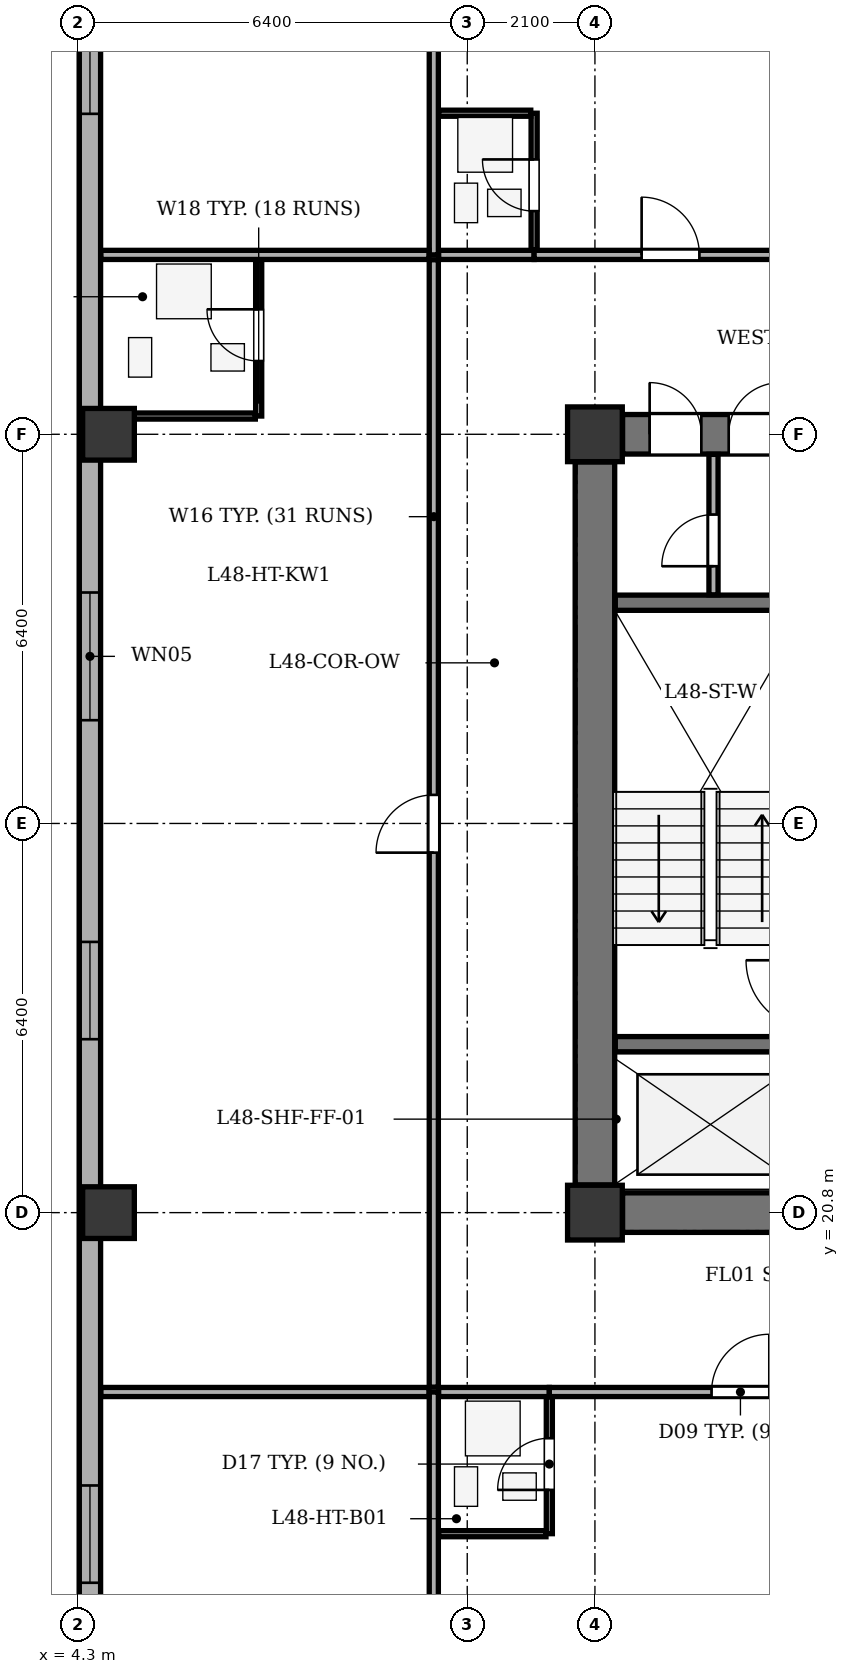
"""IFC4 building model, lengths in metres.
Left out: names, types, materials, properties, quantities, classifications, styles, units other than length and angle.
Written with IfcOpenShell. Run it as: python <this file> out.ifc"""

import sys

from ifc_helpers import new_model, si_unit, direction, frame, frame_2d, origin, origin_2d, place, context, subcontext, project, spatial, rectangle, extrude, element, fill, save


model = new_model("IFC4")
c1 = context("Model", 3, precision=1e-05, world=origin(), true_north=direction((0.0, 1.0)))
c2 = subcontext(c1, "Body", "Model", "MODEL_VIEW")
j1 = project(units=[si_unit("LENGTHUNIT", "METRE"), si_unit("PLANEANGLEUNIT", "RADIAN")], contexts=[c1])
p1 = place(None, origin())
s1 = spatial("IfcSite", under=j1, at=p1, CompositionType="ELEMENT")
p2 = place(p1, origin())
s2 = spatial("IfcBuilding", under=s1, at=p2, CompositionType="ELEMENT")
p3 = place(p2, frame((0.0, 0.0, 186.8)))
s3 = spatial("IfcBuildingStorey", under=s2, at=p3, CompositionType="ELEMENT", Elevation=186.8)
for number, where, z_axis, x_axis in (
    (1, (12.8, 20.8, 0.0), (0.0, 0.0, 1.0), (1.0, 0.0, 0.0)),
    (2, (12.8, 33.6, 0.0), (0.0, 0.0, 1.0), (1.0, 0.0, 0.0)),
):
    element("IfcColumn", number, at=place(p3, frame(where, z_axis=z_axis, x_axis=x_axis)), inside=s3, PredefinedType="COLUMN", context=c2, shape_type="SweptSolid", body=[
        extrude(rectangle(XDim=0.9, YDim=0.9, at=origin_2d()), origin(), (0.0, 0.0, 1.0), 3.5),
    ])
for number, where, z_axis, x_axis in (
    (3, (4.8, 20.8, 0.0), (0.0, 0.0, 1.0), (1.0, 0.0, 0.0)),
    (4, (4.8, 33.6, 0.0), (0.0, 0.0, 1.0), (1.0, 0.0, 0.0)),
):
    element("IfcColumn", number, at=place(p3, frame(where, z_axis=z_axis, x_axis=x_axis)), inside=s3, PredefinedType="COLUMN", context=c2, shape_type="SweptSolid", body=[
        extrude(rectangle(XDim=0.85, YDim=0.85, at=origin_2d()), origin(), (0.0, 0.0, 1.0), 3.5),
    ])
p4 = place(p3, frame((4.495, 12.9, 0.0), z_axis=(0.0, 0.0, 1.0), x_axis=(0.0, 1.0, 0.0)))
e5 = element("IfcWall", 5, at=p4, inside=s3, PredefinedType="STANDARD", context=c2, shape_type="SweptSolid", body=[
    extrude(rectangle(XDim=35.0, YDim=0.35, at=frame_2d((17.5, 0.0))), origin(), (0.0, 0.0, 1.0), 2.785),
])
p5 = place(p4, frame((1.813, 0.0, 0.75)))
e6 = element("IfcOpeningElement", 6, at=p5, cuts=e5, PredefinedType="OPENING", context=c2, shape_type="SweptSolid", body=[
    extrude(rectangle(XDim=1.6, YDim=1.75, at=frame_2d((0.8, 0.875))), frame((0.0, 0.185, 0.0), z_axis=(0.0, -1.0, 0.0), x_axis=(1.0, 0.0, 0.0)), (0.0, 0.0, 1.0), 0.37),
])
p6 = place(p4, frame((10.752, 0.0, 0.75)))
e7 = element("IfcOpeningElement", 7, at=p6, cuts=e5, PredefinedType="OPENING", context=c2, shape_type="SweptSolid", body=[
    extrude(rectangle(XDim=1.6, YDim=1.75, at=frame_2d((0.8, 0.875))), frame((0.0, 0.185, 0.0), z_axis=(0.0, -1.0, 0.0), x_axis=(1.0, 0.0, 0.0)), (0.0, 0.0, 1.0), 0.37),
])
p7 = place(p4, frame((15.998, 0.0, 0.75)))
e8 = element("IfcOpeningElement", 8, at=p7, cuts=e5, PredefinedType="OPENING", context=c2, shape_type="SweptSolid", body=[
    extrude(rectangle(XDim=2.1, YDim=1.75, at=frame_2d((1.05, 0.875))), frame((0.0, 0.185, 0.0), z_axis=(0.0, -1.0, 0.0), x_axis=(1.0, 0.0, 0.0)), (0.0, 0.0, 1.0), 0.37),
])
p8 = place(p4, frame((25.97, 0.0, 0.75)))
e9 = element("IfcOpeningElement", 9, at=p8, cuts=e5, PredefinedType="OPENING", context=c2, shape_type="SweptSolid", body=[
    extrude(rectangle(XDim=1.6, YDim=1.75, at=frame_2d((0.8, 0.875))), frame((0.0, 0.185, 0.0), z_axis=(0.0, -1.0, 0.0), x_axis=(1.0, 0.0, 0.0)), (0.0, 0.0, 1.0), 0.37),
])
p9 = place(p4, frame((30.555, 0.0, 0.75)))
e10 = element("IfcOpeningElement", 10, at=p9, cuts=e5, PredefinedType="OPENING", context=c2, shape_type="SweptSolid", body=[
    extrude(rectangle(XDim=2.1, YDim=1.75, at=frame_2d((1.05, 0.875))), frame((0.0, 0.185, 0.0), z_axis=(0.0, -1.0, 0.0), x_axis=(1.0, 0.0, 0.0)), (0.0, 0.0, 1.0), 0.37),
])
p10 = place(p3, frame((12.8, 21.255, 0.0), z_axis=(0.0, 0.0, 1.0), x_axis=(0.0, 1.0, 0.0)))
e11 = element("IfcWall", 11, at=p10, inside=s3, PredefinedType="SHEAR", context=c2, shape_type="SweptSolid", body=[
    extrude(rectangle(XDim=11.89, YDim=0.65, at=frame_2d((5.945, 0.0))), origin(), (0.0, 0.0, 1.0), 3.2),
])
p11 = place(p3, frame((13.255, 20.8, 0.0), z_axis=(0.0, 0.0, 1.0), x_axis=(1.0, 0.0, 0.0)))
e12 = element("IfcWall", 12, at=p11, inside=s3, PredefinedType="SHEAR", context=c2, shape_type="SweptSolid", body=[
    extrude(rectangle(XDim=7.09, YDim=0.65, at=frame_2d((3.545, 0.0))), origin(), (0.0, 0.0, 1.0), 3.2),
])
p12 = place(p3, frame((13.255, 33.6, 0.0), z_axis=(0.0, 0.0, 1.0), x_axis=(1.0, 0.0, 0.0)))
e13 = element("IfcWall", 13, at=p12, inside=s3, PredefinedType="SHEAR", context=c2, shape_type="SweptSolid", body=[
    extrude(rectangle(XDim=7.09, YDim=0.65, at=frame_2d((3.545, 0.0))), origin(), (0.0, 0.0, 1.0), 3.2),
])
p13 = place(p12, frame((0.445, 0.0, 0.0)))
e14 = element("IfcOpeningElement", 14, at=p13, cuts=e13, PredefinedType="OPENING", context=c2, shape_type="SweptSolid", body=[
    extrude(rectangle(XDim=0.85, YDim=2.02, at=frame_2d((0.425, 1.01))), frame((0.0, 0.335, 0.0), z_axis=(0.0, -1.0, 0.0), x_axis=(1.0, 0.0, 0.0)), (0.0, 0.0, 1.0), 0.67),
])
p14 = place(p12, frame((1.745, 0.0, 0.0)))
e15 = element("IfcOpeningElement", 15, at=p14, cuts=e13, PredefinedType="OPENING", context=c2, shape_type="SweptSolid", body=[
    extrude(rectangle(XDim=0.85, YDim=2.02, at=frame_2d((0.425, 1.01))), frame((0.0, 0.335, 0.0), z_axis=(0.0, -1.0, 0.0), x_axis=(1.0, 0.0, 0.0)), (0.0, 0.0, 1.0), 0.67),
])
for number, where, z_axis, x_axis in (
    (16, (13.135, 23.57, 0.0), (0.0, 0.0, 1.0), (1.0, 0.0, 0.0)),
    (17, (13.135, 30.83, 0.0), (0.0, 0.0, 1.0), (1.0, 0.0, 0.0)),
):
    element("IfcWall", number, at=place(p3, frame(where, z_axis=z_axis, x_axis=x_axis)), inside=s3, PredefinedType="SHEAR", context=c2, shape_type="SweptSolid", body=[
        extrude(rectangle(XDim=3.175, YDim=0.25, at=frame_2d((1.587, 0.0))), origin(), (0.0, 0.0, 1.0), 3.2),
    ])
p15 = place(p3, frame((14.75, 30.96, 0.0), z_axis=(0.0, 0.0, 1.0), x_axis=(0.0, 1.0, 0.0)))
e18 = element("IfcWall", 18, at=p15, inside=s3, PredefinedType="PARTITIONING", context=c2, shape_type="SweptSolid", body=[
    extrude(rectangle(XDim=2.31, YDim=0.15, at=frame_2d((1.155, 0.0))), origin(), (0.0, 0.0, 1.0), 3.2),
])
p16 = place(p15, frame((0.47, 0.0, 0.0)))
e19 = element("IfcOpeningElement", 19, at=p16, cuts=e18, PredefinedType="OPENING", context=c2, shape_type="SweptSolid", body=[
    extrude(rectangle(XDim=0.85, YDim=2.02, at=frame_2d((0.425, 1.01))), frame((0.0, 0.085, 0.0), z_axis=(0.0, -1.0, 0.0), x_axis=(1.0, 0.0, 0.0)), (0.0, 0.0, 1.0), 0.17),
])
p17 = place(p3, frame((10.15, 8.275, 0.0), z_axis=(0.0, 0.0, 1.0), x_axis=(0.0, 1.0, 0.0)))
e20 = element("IfcWall", 20, at=p17, inside=s3, PredefinedType="PARTITIONING", context=c2, shape_type="SweptSolid", body=[
    extrude(rectangle(XDim=9.575, YDim=0.15, at=frame_2d((4.788, 0.0))), origin(), (0.0, 0.0, 1.0), 3.2),
])
p18 = place(p3, frame((10.23, 17.85, 0.0), z_axis=(0.0, 0.0, 1.0), x_axis=(1.0, 0.0, 0.0)))
e21 = element("IfcWall", 21, at=p18, inside=s3, PredefinedType="PARTITIONING", context=c2, shape_type="SweptSolid", body=[
    extrude(rectangle(XDim=1.82, YDim=0.15, at=frame_2d((0.91, 0.0))), origin(), (0.0, 0.0, 1.0), 3.2),
])
p19 = place(p3, frame((12.05, 17.85, 0.0), z_axis=(0.0, 0.0, 1.0), x_axis=(1.0, 0.0, 0.0)))
e22 = element("IfcWall", 22, at=p19, inside=s3, PredefinedType="PARTITIONING", context=c2, shape_type="SweptSolid", body=[
    extrude(rectangle(XDim=6.296, YDim=0.15, at=frame_2d((3.148, 0.0))), origin(), (0.0, 0.0, 1.0), 3.2),
])
p20 = place(p19, frame((2.668, 0.0, 0.0)))
e23 = element("IfcOpeningElement", 23, at=p20, cuts=e22, PredefinedType="OPENING", context=c2, shape_type="SweptSolid", body=[
    extrude(rectangle(XDim=0.95, YDim=2.1, at=frame_2d((0.475, 1.05))), frame((0.0, 0.085, 0.0), z_axis=(0.0, -1.0, 0.0), x_axis=(1.0, 0.0, 0.0)), (0.0, 0.0, 1.0), 0.17),
])
p21 = place(p3, frame((12.05, 15.52, 0.0), z_axis=(0.0, 0.0, 1.0), x_axis=(0.0, 1.0, 0.0)))
e24 = element("IfcWall", 24, at=p21, inside=s3, PredefinedType="PARTITIONING", context=c2, shape_type="SweptSolid", body=[
    extrude(rectangle(XDim=2.25, YDim=0.1, at=frame_2d((1.125, 0.0))), origin(), (0.0, 0.0, 1.0), 3.2),
])
p22 = place(p21, frame((0.72, 0.0, 0.0)))
e25 = element("IfcOpeningElement", 25, at=p22, cuts=e24, PredefinedType="OPENING", context=c2, shape_type="SweptSolid", body=[
    extrude(rectangle(XDim=0.85, YDim=2.05, at=frame_2d((0.425, 1.025))), frame((0.0, 0.06, 0.0), z_axis=(0.0, -1.0, 0.0), x_axis=(1.0, 0.0, 0.0)), (0.0, 0.0, 1.0), 0.12),
])
p23 = place(p3, frame((10.23, 15.52, 0.0), z_axis=(0.0, 0.0, 1.0), x_axis=(1.0, 0.0, 0.0)))
e26 = element("IfcWall", 26, at=p23, inside=s3, PredefinedType="PARTITIONING", context=c2, shape_type="SweptSolid", body=[
    extrude(rectangle(XDim=1.765, YDim=0.1, at=frame_2d((0.883, 0.0))), origin(), (0.0, 0.0, 1.0), 3.2),
])
p24 = place(p3, frame((10.15, 36.55, 0.0), z_axis=(0.0, 0.0, 1.0), x_axis=(0.0, 1.0, 0.0)))
e27 = element("IfcWall", 27, at=p24, inside=s3, PredefinedType="PARTITIONING", context=c2, shape_type="SweptSolid", body=[
    extrude(rectangle(XDim=15.975, YDim=0.15, at=frame_2d((7.987, 0.0))), origin(), (0.0, 0.0, 1.0), 3.2),
])
p25 = place(p3, frame((10.23, 36.55, 0.0), z_axis=(0.0, 0.0, 1.0), x_axis=(1.0, 0.0, 0.0)))
e28 = element("IfcWall", 28, at=p25, inside=s3, PredefinedType="PARTITIONING", context=c2, shape_type="SweptSolid", body=[
    extrude(rectangle(XDim=1.57, YDim=0.15, at=frame_2d((0.785, 0.0))), origin(), (0.0, 0.0, 1.0), 3.2),
])
p26 = place(p3, frame((11.8, 36.55, 0.0), z_axis=(0.0, 0.0, 1.0), x_axis=(1.0, 0.0, 0.0)))
e29 = element("IfcWall", 29, at=p26, inside=s3, PredefinedType="PARTITIONING", context=c2, shape_type="SweptSolid", body=[
    extrude(rectangle(XDim=4.497, YDim=0.15, at=frame_2d((2.249, 0.0))), origin(), (0.0, 0.0, 1.0), 3.2),
])
p27 = place(p26, frame((1.768, 0.0, 0.0)))
e30 = element("IfcOpeningElement", 30, at=p27, cuts=e29, PredefinedType="OPENING", context=c2, shape_type="SweptSolid", body=[
    extrude(rectangle(XDim=0.95, YDim=2.1, at=frame_2d((0.475, 1.05))), frame((0.0, 0.085, 0.0), z_axis=(0.0, -1.0, 0.0), x_axis=(1.0, 0.0, 0.0)), (0.0, 0.0, 1.0), 0.17),
])
p28 = place(p3, frame((11.8, 36.63, 0.0), z_axis=(0.0, 0.0, 1.0), x_axis=(0.0, 1.0, 0.0)))
e31 = element("IfcWall", 31, at=p28, inside=s3, PredefinedType="PARTITIONING", context=c2, shape_type="SweptSolid", body=[
    extrude(rectangle(XDim=2.25, YDim=0.1, at=frame_2d((1.125, 0.0))), origin(), (0.0, 0.0, 1.0), 3.2),
])
p29 = place(p28, frame((0.64, 0.0, 0.0)))
e32 = element("IfcOpeningElement", 32, at=p29, cuts=e31, PredefinedType="OPENING", context=c2, shape_type="SweptSolid", body=[
    extrude(rectangle(XDim=0.85, YDim=2.05, at=frame_2d((0.425, 1.025))), frame((0.0, 0.06, 0.0), z_axis=(0.0, -1.0, 0.0), x_axis=(1.0, 0.0, 0.0)), (0.0, 0.0, 1.0), 0.12),
])
p30 = place(p3, frame((10.23, 38.88, 0.0), z_axis=(0.0, 0.0, 1.0), x_axis=(1.0, 0.0, 0.0)))
e33 = element("IfcWall", 33, at=p30, inside=s3, PredefinedType="PARTITIONING", context=c2, shape_type="SweptSolid", body=[
    extrude(rectangle(XDim=1.515, YDim=0.1, at=frame_2d((0.758, 0.0))), origin(), (0.0, 0.0, 1.0), 3.2),
])
for number, where, z_axis, x_axis in (
    (34, (4.675, 17.85, 0.0), (0.0, 0.0, 1.0), (1.0, 0.0, 0.0)),
    (35, (4.675, 36.55, 0.0), (0.0, 0.0, 1.0), (1.0, 0.0, 0.0)),
):
    element("IfcWall", number, at=place(p3, frame(where, z_axis=z_axis, x_axis=x_axis)), inside=s3, PredefinedType="PARTITIONING", context=c2, shape_type="SweptSolid", body=[
        extrude(rectangle(XDim=5.395, YDim=0.15, at=frame_2d((2.698, 0.0))), origin(), (0.0, 0.0, 1.0), 3.2),
    ])
p31 = place(p3, frame((10.15, 17.93, 0.0), z_axis=(0.0, 0.0, 1.0), x_axis=(0.0, 1.0, 0.0)))
e36 = element("IfcWall", 36, at=p31, inside=s3, PredefinedType="PARTITIONING", context=c2, shape_type="SweptSolid", body=[
    extrude(rectangle(XDim=18.54, YDim=0.15, at=frame_2d((9.27, 0.0))), origin(), (0.0, 0.0, 1.0), 3.2),
])
p32 = place(p31, frame((8.79, 0.0, 0.0)))
e37 = element("IfcOpeningElement", 37, at=p32, cuts=e36, PredefinedType="OPENING", context=c2, shape_type="SweptSolid", body=[
    extrude(rectangle(XDim=0.95, YDim=2.1, at=frame_2d((0.475, 1.05))), frame((0.0, 0.085, 0.0), z_axis=(0.0, -1.0, 0.0), x_axis=(1.0, 0.0, 0.0)), (0.0, 0.0, 1.0), 0.17),
])
p33 = place(p3, frame((7.27, 33.9, 0.0), z_axis=(0.0, 0.0, 1.0), x_axis=(0.0, 1.0, 0.0)))
e38 = element("IfcWall", 38, at=p33, inside=s3, PredefinedType="PARTITIONING", context=c2, shape_type="SweptSolid", body=[
    extrude(rectangle(XDim=2.57, YDim=0.1, at=frame_2d((1.285, 0.0))), origin(), (0.0, 0.0, 1.0), 3.2),
])
p34 = place(p33, frame((0.905, 0.0, 0.0)))
e39 = element("IfcOpeningElement", 39, at=p34, cuts=e38, PredefinedType="OPENING", context=c2, shape_type="SweptSolid", body=[
    extrude(rectangle(XDim=0.85, YDim=2.05, at=frame_2d((0.425, 1.025))), frame((0.0, 0.06, 0.0), z_axis=(0.0, -1.0, 0.0), x_axis=(1.0, 0.0, 0.0)), (0.0, 0.0, 1.0), 0.12),
])
p35 = place(p3, frame((4.675, 33.9, 0.0), z_axis=(0.0, 0.0, 1.0), x_axis=(1.0, 0.0, 0.0)))
e40 = element("IfcWall", 40, at=p35, inside=s3, PredefinedType="PARTITIONING", context=c2, shape_type="SweptSolid", body=[
    extrude(rectangle(XDim=2.54, YDim=0.1, at=frame_2d((1.27, 0.0))), origin(), (0.0, 0.0, 1.0), 2.535),
])
p36 = place(p5, origin())
e41 = element("IfcWindow", 41, at=p36, inside=s3, PartitioningType="SINGLE_PANEL", PredefinedType="WINDOW", context=c2, shape_type="SweptSolid", body=[
    extrude(rectangle(XDim=1.6, YDim=1.75, at=frame_2d((0.8, 0.875))), frame((0.0, -0.01, 0.0), z_axis=(0.0, -1.0, 0.0), x_axis=(1.0, 0.0, 0.0)), (0.0, 0.0, 1.0), 0.06),
])
fill(e6, e41)
p37 = place(p6, origin())
e42 = element("IfcWindow", 42, at=p37, inside=s3, PartitioningType="SINGLE_PANEL", PredefinedType="WINDOW", context=c2, shape_type="SweptSolid", body=[
    extrude(rectangle(XDim=1.6, YDim=1.75, at=frame_2d((0.8, 0.875))), frame((0.0, -0.01, 0.0), z_axis=(0.0, -1.0, 0.0), x_axis=(1.0, 0.0, 0.0)), (0.0, 0.0, 1.0), 0.06),
])
fill(e7, e42)
p38 = place(p7, origin())
e43 = element("IfcWindow", 43, at=p38, inside=s3, PartitioningType="SINGLE_PANEL", PredefinedType="WINDOW", context=c2, shape_type="SweptSolid", body=[
    extrude(rectangle(XDim=2.1, YDim=1.75, at=frame_2d((1.05, 0.875))), frame((0.0, -0.01, 0.0), z_axis=(0.0, -1.0, 0.0), x_axis=(1.0, 0.0, 0.0)), (0.0, 0.0, 1.0), 0.06),
])
fill(e8, e43)
p39 = place(p8, origin())
e44 = element("IfcWindow", 44, at=p39, inside=s3, PartitioningType="SINGLE_PANEL", PredefinedType="WINDOW", context=c2, shape_type="SweptSolid", body=[
    extrude(rectangle(XDim=1.6, YDim=1.75, at=frame_2d((0.8, 0.875))), frame((0.0, -0.01, 0.0), z_axis=(0.0, -1.0, 0.0), x_axis=(1.0, 0.0, 0.0)), (0.0, 0.0, 1.0), 0.06),
])
fill(e9, e44)
p40 = place(p13, origin())
e45 = element("IfcDoor", 45, at=p40, inside=s3, OperationType="SINGLE_SWING_LEFT", PredefinedType="DOOR", context=c2, shape_type="SweptSolid", body=[
    extrude(rectangle(XDim=0.85, YDim=2.02, at=frame_2d((0.425, 1.01))), frame((0.0, 0.025, 0.0), z_axis=(0.0, -1.0, 0.0), x_axis=(1.0, 0.0, 0.0)), (0.0, 0.0, 1.0), 0.05),
])
fill(e14, e45)
p41 = place(p14, origin())
e46 = element("IfcDoor", 46, at=p41, inside=s3, OperationType="SINGLE_SWING_RIGHT", PredefinedType="DOOR", context=c2, shape_type="SweptSolid", body=[
    extrude(rectangle(XDim=0.85, YDim=2.02, at=frame_2d((0.425, 1.01))), frame((0.0, 0.025, 0.0), z_axis=(0.0, -1.0, 0.0), x_axis=(1.0, 0.0, 0.0)), (0.0, 0.0, 1.0), 0.05),
])
fill(e15, e46)
p42 = place(p16, origin())
e47 = element("IfcDoor", 47, at=p42, inside=s3, OperationType="SINGLE_SWING_LEFT", PredefinedType="DOOR", context=c2, shape_type="SweptSolid", body=[
    extrude(rectangle(XDim=0.85, YDim=2.02, at=frame_2d((0.425, 1.01))), frame((0.0, 0.025, 0.0), z_axis=(0.0, -1.0, 0.0), x_axis=(1.0, 0.0, 0.0)), (0.0, 0.0, 1.0), 0.05),
])
fill(e19, e47)
p43 = place(p22, origin())
e48 = element("IfcDoor", 48, at=p43, inside=s3, OperationType="SINGLE_SWING_LEFT", PredefinedType="DOOR", context=c2, shape_type="SweptSolid", body=[
    extrude(rectangle(XDim=0.85, YDim=2.05, at=frame_2d((0.425, 1.025))), frame((0.0, 0.025, 0.0), z_axis=(0.0, -1.0, 0.0), x_axis=(1.0, 0.0, 0.0)), (0.0, 0.0, 1.0), 0.05),
])
fill(e25, e48)
p44 = place(p20, origin())
e49 = element("IfcDoor", 49, at=p44, inside=s3, OperationType="SINGLE_SWING_RIGHT", PredefinedType="DOOR", context=c2, shape_type="SweptSolid", body=[
    extrude(rectangle(XDim=0.95, YDim=2.1, at=frame_2d((0.475, 1.05))), frame((0.0, 0.025, 0.0), z_axis=(0.0, -1.0, 0.0), x_axis=(1.0, 0.0, 0.0)), (0.0, 0.0, 1.0), 0.05),
])
fill(e23, e49)
p45 = place(p29, origin())
e50 = element("IfcDoor", 50, at=p45, inside=s3, OperationType="SINGLE_SWING_RIGHT", PredefinedType="DOOR", context=c2, shape_type="SweptSolid", body=[
    extrude(rectangle(XDim=0.85, YDim=2.05, at=frame_2d((0.425, 1.025))), frame((0.0, 0.025, 0.0), z_axis=(0.0, -1.0, 0.0), x_axis=(1.0, 0.0, 0.0)), (0.0, 0.0, 1.0), 0.05),
])
fill(e32, e50)
p46 = place(p27, origin())
e51 = element("IfcDoor", 51, at=p46, inside=s3, OperationType="SINGLE_SWING_LEFT", PredefinedType="DOOR", context=c2, shape_type="SweptSolid", body=[
    extrude(rectangle(XDim=0.95, YDim=2.1, at=frame_2d((0.475, 1.05))), frame((0.0, 0.025, 0.0), z_axis=(0.0, -1.0, 0.0), x_axis=(1.0, 0.0, 0.0)), (0.0, 0.0, 1.0), 0.05),
])
fill(e30, e51)
p47 = place(p34, origin())
e52 = element("IfcDoor", 52, at=p47, inside=s3, OperationType="SINGLE_SWING_RIGHT", PredefinedType="DOOR", context=c2, shape_type="SweptSolid", body=[
    extrude(rectangle(XDim=0.85, YDim=2.05, at=frame_2d((0.425, 1.025))), frame((0.0, 0.025, 0.0), z_axis=(0.0, -1.0, 0.0), x_axis=(1.0, 0.0, 0.0)), (0.0, 0.0, 1.0), 0.05),
])
fill(e39, e52)
p48 = place(p32, origin())
e53 = element("IfcDoor", 53, at=p48, inside=s3, OperationType="SINGLE_SWING_LEFT", PredefinedType="DOOR", context=c2, shape_type="SweptSolid", body=[
    extrude(rectangle(XDim=0.95, YDim=2.1, at=frame_2d((0.475, 1.05))), frame((0.0, 0.025, 0.0), z_axis=(0.0, -1.0, 0.0), x_axis=(1.0, 0.0, 0.0)), (0.0, 0.0, 1.0), 0.05),
])
fill(e37, e53)
save(model, sys.argv[1])
